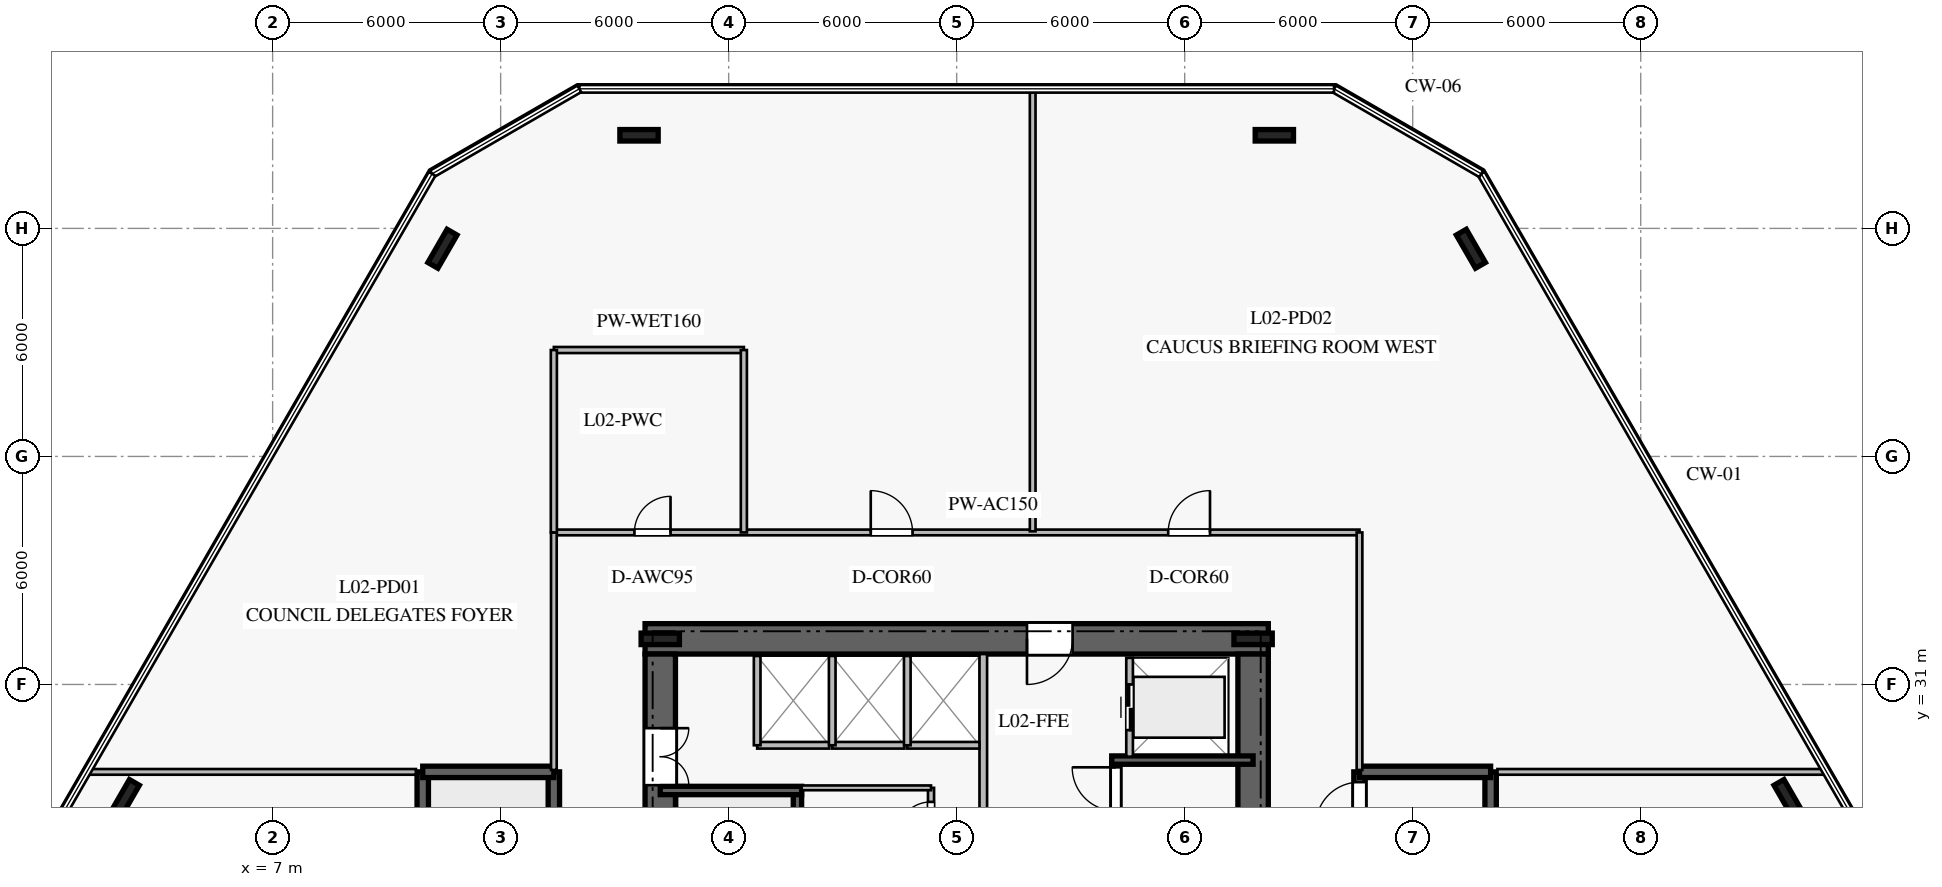
"""IFC4 building model, lengths in metres.
Left out: names, types, materials, properties, quantities, classifications, styles, units other than length and angle.
Written with IfcOpenShell. Run it as: python <this file> out.ifc"""

import sys

from ifc_helpers import new_model, si_unit, direction, frame, frame_2d, origin, origin_2d, place, context, subcontext, project, spatial, rectangle, i_section, extrude, element, fill, save


model = new_model("IFC4")
c1 = context("Model", 3, precision=1e-05, world=origin(), true_north=direction((0.0, 1.0)))
c2 = subcontext(c1, "Body", "Model", "MODEL_VIEW")
j1 = project(units=[si_unit("LENGTHUNIT", "METRE"), si_unit("PLANEANGLEUNIT", "RADIAN")], contexts=[c1])
p1 = place(None, origin())
s1 = spatial("IfcSite", under=j1, at=p1, CompositionType="ELEMENT")
p2 = place(p1, origin())
s2 = spatial("IfcBuilding", under=s1, at=p2, CompositionType="ELEMENT")
p3 = place(p2, frame((0.0, 0.0, 9.8)))
s3 = spatial("IfcBuildingStorey", under=s2, at=p3, CompositionType="ELEMENT", Elevation=9.8)
p4 = place(p3, frame((33.2, 32.2, 0.0), z_axis=(0.0, 0.0, 1.0), x_axis=(-1.0, 0.0, 0.0)))
e1 = element("IfcWall", 1, at=p4, inside=s3, PredefinedType="SHEAR", context=c2, shape_type="SweptSolid", body=[
    extrude(rectangle(XDim=16.4, YDim=0.8, at=frame_2d((8.2, 0.0))), origin(), (0.0, 0.0, 1.0), 4.34),
])
p5 = place(p4, frame((5.15, 0.0, 0.0)))
e2 = element("IfcOpeningElement", 2, at=p5, cuts=e1, PredefinedType="OPENING", context=c2, shape_type="SweptSolid", body=[
    extrude(rectangle(XDim=1.2, YDim=2.25, at=frame_2d((0.6, 1.125))), frame((0.0, 0.41, 0.0), z_axis=(0.0, -1.0, 0.0), x_axis=(1.0, 0.0, 0.0)), (0.0, 0.0, 1.0), 0.82),
])
p6 = place(p3, frame((17.2, 31.8, 0.0), z_axis=(0.0, 0.0, 1.0), x_axis=(0.0, -1.0, 0.0)))
e3 = element("IfcWall", 3, at=p6, inside=s3, PredefinedType="SHEAR", context=c2, shape_type="SweptSolid", body=[
    extrude(rectangle(XDim=13.6, YDim=0.8, at=frame_2d((6.8, 0.0))), origin(), (0.0, 0.0, 1.0), 4.34),
])
p7 = place(p6, frame((1.95, 0.0, 0.0)))
e4 = element("IfcOpeningElement", 4, at=p7, cuts=e3, PredefinedType="OPENING", context=c2, shape_type="SweptSolid", body=[
    extrude(rectangle(XDim=1.5, YDim=2.2, at=frame_2d((0.75, 1.1))), frame((0.0, 0.41, 0.0), z_axis=(0.0, -1.0, 0.0), x_axis=(1.0, 0.0, 0.0)), (0.0, 0.0, 1.0), 0.82),
])
p8 = place(p3, frame((32.8, 18.2, 0.0), z_axis=(0.0, 0.0, 1.0), x_axis=(0.0, 1.0, 0.0)))
e5 = element("IfcWall", 5, at=p8, inside=s3, PredefinedType="SHEAR", context=c2, shape_type="SweptSolid", body=[
    extrude(rectangle(XDim=13.6, YDim=0.8, at=frame_2d((6.8, 0.0))), origin(), (0.0, 0.0, 1.0), 4.34),
])
for number, where, z_axis, x_axis in (
    (6, (32.8, 32.2, 0.0), (0.0, 0.0, 1.0), (1.0, 0.0, 0.0)),
    (7, (17.2, 32.2, 0.0), (0.0, 0.0, 1.0), (1.0, 0.0, 0.0)),
):
    element("IfcColumn", number, at=place(p3, frame(where, z_axis=z_axis, x_axis=x_axis)), inside=s3, PredefinedType="COLUMN", context=c2, shape_type="SweptSolid", body=[
        extrude(i_section(OverallWidth=0.302, OverallDepth=1.008, WebThickness=0.021, FlangeThickness=0.04, at=origin_2d()), origin(), (0.0, 0.0, 1.0), 4.6),
    ])
p9 = place(p3, frame((20.81, 20.99, 0.0), z_axis=(0.0, 0.0, 1.0), x_axis=(0.0, 1.0, 0.0)))
e8 = element("IfcWall", 8, at=p9, inside=s3, PredefinedType="SOLIDWALL", context=c2, shape_type="SweptSolid", body=[
    extrude(rectangle(XDim=7.22, YDim=0.22, at=frame_2d((3.61, 0.0))), origin(), (0.0, 0.0, 1.0), 4.34),
])
p10 = place(p9, frame((0.18, 0.0, 0.0)))
e9 = element("IfcOpeningElement", 9, at=p10, cuts=e8, PredefinedType="OPENING", context=c2, shape_type="SweptSolid", body=[
    extrude(rectangle(XDim=1.15, YDim=2.2, at=frame_2d((0.575, 1.1))), frame((0.0, 0.12, 0.0), z_axis=(0.0, -1.0, 0.0), x_axis=(1.0, 0.0, 0.0)), (0.0, 0.0, 1.0), 0.24),
])
p11 = place(p3, frame((17.2, 28.21, 0.0), z_axis=(0.0, 0.0, 1.0), x_axis=(1.0, 0.0, 0.0)))
e10 = element("IfcWall", 10, at=p11, inside=s3, PredefinedType="SOLIDWALL", context=c2, shape_type="SweptSolid", body=[
    extrude(rectangle(XDim=3.72, YDim=0.22, at=frame_2d((1.86, 0.0))), origin(), (0.0, 0.0, 1.0), 4.34),
])
p12 = place(p3, frame((29.19, 21.79, 0.0), z_axis=(0.0, 0.0, 1.0), x_axis=(0.0, 1.0, 0.0)))
e11 = element("IfcWall", 11, at=p12, inside=s3, PredefinedType="SOLIDWALL", context=c2, shape_type="SweptSolid", body=[
    extrude(rectangle(XDim=7.22, YDim=0.22, at=frame_2d((3.61, 0.0))), origin(), (0.0, 0.0, 1.0), 4.34),
])
p13 = place(p12, frame((5.88, 0.0, 0.0)))
e12 = element("IfcOpeningElement", 12, at=p13, cuts=e11, PredefinedType="OPENING", context=c2, shape_type="SweptSolid", body=[
    extrude(rectangle(XDim=1.15, YDim=2.2, at=frame_2d((0.575, 1.1))), frame((0.0, 0.12, 0.0), z_axis=(0.0, -1.0, 0.0), x_axis=(1.0, 0.0, 0.0)), (0.0, 0.0, 1.0), 0.24),
])
p14 = place(p3, frame((29.08, 29.01, 0.0), z_axis=(0.0, 0.0, 1.0), x_axis=(1.0, 0.0, 0.0)))
e13 = element("IfcWall", 13, at=p14, inside=s3, PredefinedType="SOLIDWALL", context=c2, shape_type="SweptSolid", body=[
    extrude(rectangle(XDim=3.72, YDim=0.22, at=frame_2d((1.86, 0.0))), origin(), (0.0, 0.0, 1.0), 4.34),
])
p15 = place(p3, frame((14.4, 21.3, 0.0), z_axis=(0.0, 0.0, 1.0), x_axis=(0.0, 1.0, 0.0)))
e14 = element("IfcWall", 14, at=p15, inside=s3, PredefinedType="SOLIDWALL", context=c2, shape_type="SweptSolid", body=[
    extrude(rectangle(XDim=7.4, YDim=0.3, at=frame_2d((3.7, 0.0))), origin(), (0.0, 0.0, 1.0), 4.34),
])
p16 = place(p15, frame((0.22, 0.0, 0.0)))
e15 = element("IfcOpeningElement", 15, at=p16, cuts=e14, PredefinedType="OPENING", context=c2, shape_type="SweptSolid", body=[
    extrude(rectangle(XDim=1.15, YDim=2.2, at=frame_2d((0.575, 1.1))), frame((0.0, 0.16, 0.0), z_axis=(0.0, -1.0, 0.0), x_axis=(1.0, 0.0, 0.0)), (0.0, 0.0, 1.0), 0.32),
])
p17 = place(p3, frame((10.95, 21.3, 0.0), z_axis=(0.0, 0.0, 1.0), x_axis=(0.0, 1.0, 0.0)))
e16 = element("IfcWall", 16, at=p17, inside=s3, PredefinedType="SOLIDWALL", context=c2, shape_type="SweptSolid", body=[
    extrude(rectangle(XDim=7.4, YDim=0.3, at=frame_2d((3.7, 0.0))), origin(), (0.0, 0.0, 1.0), 4.34),
])
p18 = place(p3, frame((10.95, 28.7, 0.0), z_axis=(0.0, 0.0, 1.0), x_axis=(1.0, 0.0, 0.0)))
e17 = element("IfcWall", 17, at=p18, inside=s3, PredefinedType="SOLIDWALL", context=c2, shape_type="SweptSolid", body=[
    extrude(rectangle(XDim=3.45, YDim=0.3, at=frame_2d((1.725, 0.0))), origin(), (0.0, 0.0, 1.0), 4.34),
])
p19 = place(p3, frame((35.6, 21.3, 0.0), z_axis=(0.0, 0.0, 1.0), x_axis=(0.0, 1.0, 0.0)))
e18 = element("IfcWall", 18, at=p19, inside=s3, PredefinedType="SOLIDWALL", context=c2, shape_type="SweptSolid", body=[
    extrude(rectangle(XDim=7.4, YDim=0.3, at=frame_2d((3.7, 0.0))), origin(), (0.0, 0.0, 1.0), 4.34),
])
p20 = place(p19, frame((5.98, 0.0, 0.0)))
e19 = element("IfcOpeningElement", 19, at=p20, cuts=e18, PredefinedType="OPENING", context=c2, shape_type="SweptSolid", body=[
    extrude(rectangle(XDim=1.15, YDim=2.2, at=frame_2d((0.575, 1.1))), frame((0.0, 0.16, 0.0), z_axis=(0.0, -1.0, 0.0), x_axis=(1.0, 0.0, 0.0)), (0.0, 0.0, 1.0), 0.32),
])
p21 = place(p3, frame((39.05, 21.3, 0.0), z_axis=(0.0, 0.0, 1.0), x_axis=(0.0, 1.0, 0.0)))
e20 = element("IfcWall", 20, at=p21, inside=s3, PredefinedType="SOLIDWALL", context=c2, shape_type="SweptSolid", body=[
    extrude(rectangle(XDim=7.4, YDim=0.3, at=frame_2d((3.7, 0.0))), origin(), (0.0, 0.0, 1.0), 4.34),
])
p22 = place(p3, frame((35.6, 28.7, 0.0), z_axis=(0.0, 0.0, 1.0), x_axis=(1.0, 0.0, 0.0)))
e21 = element("IfcWall", 21, at=p22, inside=s3, PredefinedType="SOLIDWALL", context=c2, shape_type="SweptSolid", body=[
    extrude(rectangle(XDim=3.45, YDim=0.3, at=frame_2d((1.725, 0.0))), origin(), (0.0, 0.0, 1.0), 4.34),
])
for number, where, z_axis, x_axis in (
    (22, (46.89, 27.986, 0.0), (0.0, 0.0, 1.0), (-0.5, 0.866, 0.0)),
    (23, (38.531, 42.464, 0.0), (0.0, 0.0, 1.0), (-0.5, 0.866, 0.0)),
    (24, (33.359, 45.45, 0.0), (0.0, 0.0, 1.0), (1.0, 0.0, 0.0)),
    (25, (16.641, 45.45, 0.0), (0.0, 0.0, 1.0), (1.0, 0.0, 0.0)),
    (26, (11.469, 42.464, 0.0), (0.0, 0.0, 1.0), (0.5, 0.866, 0.0)),
    (27, (3.11, 27.986, 0.0), (0.0, 0.0, 1.0), (0.5, 0.866, 0.0)),
):
    element("IfcColumn", number, at=place(p3, frame(where, z_axis=z_axis, x_axis=x_axis)), inside=s3, PredefinedType="COLUMN", context=c2, shape_type="SweptSolid", body=[
        extrude(i_section(OverallWidth=0.302, OverallDepth=1.008, WebThickness=0.021, FlangeThickness=0.04, at=origin_2d()), origin(), (0.0, 0.0, 1.0), 4.6),
    ])
p23 = place(p3, frame((25.7, 26.65, 0.0), z_axis=(0.0, 0.0, 1.0), x_axis=(0.0, 1.0, 0.0)))
e28 = element("IfcWall", 28, at=p23, inside=s3, PredefinedType="PARTITIONING", context=c2, shape_type="SweptSolid", body=[
    extrude(rectangle(XDim=5.15, YDim=0.2, at=frame_2d((2.575, 0.0))), origin(), (0.0, 0.0, 1.0), 4.34),
])
p24 = place(p3, frame((24.325, 23.35, 0.0), z_axis=(0.0, 0.0, 1.0), x_axis=(0.0, 1.0, 0.0)))
e29 = element("IfcWall", 29, at=p24, inside=s3, PredefinedType="PLUMBINGWALL", context=c2, shape_type="SweptSolid", body=[
    extrude(rectangle(XDim=4.93, YDim=0.16, at=frame_2d((2.465, 0.0))), origin(), (0.0, 0.0, 1.0), 4.34),
])
p25 = place(p24, frame((0.375, 0.0, 0.0)))
e30 = element("IfcOpeningElement", 30, at=p25, cuts=e29, PredefinedType="OPENING", context=c2, shape_type="SweptSolid", body=[
    extrude(rectangle(XDim=0.95, YDim=2.1, at=frame_2d((0.475, 1.05))), frame((0.0, 0.09, 0.0), z_axis=(0.0, -1.0, 0.0), x_axis=(1.0, 0.0, 0.0)), (0.0, 0.0, 1.0), 0.18),
])
p26 = place(p24, frame((2.035, 0.0, 0.0)))
e31 = element("IfcOpeningElement", 31, at=p26, cuts=e29, PredefinedType="OPENING", context=c2, shape_type="SweptSolid", body=[
    extrude(rectangle(XDim=0.9, YDim=2.1, at=frame_2d((0.45, 1.05))), frame((0.0, 0.09, 0.0), z_axis=(0.0, -1.0, 0.0), x_axis=(1.0, 0.0, 0.0)), (0.0, 0.0, 1.0), 0.18),
])
p27 = place(p24, frame((3.66, 0.0, 0.0)))
e32 = element("IfcOpeningElement", 32, at=p27, cuts=e29, PredefinedType="OPENING", context=c2, shape_type="SweptSolid", body=[
    extrude(rectangle(XDim=0.9, YDim=2.1, at=frame_2d((0.45, 1.05))), frame((0.0, 0.09, 0.0), z_axis=(0.0, -1.0, 0.0), x_axis=(1.0, 0.0, 0.0)), (0.0, 0.0, 1.0), 0.18),
])
p28 = place(p3, frame((20.92, 28.28, 0.0), z_axis=(0.0, 0.0, 1.0), x_axis=(1.0, 0.0, 0.0)))
e33 = element("IfcWall", 33, at=p28, inside=s3, PredefinedType="PARTITIONING", context=c2, shape_type="SweptSolid", body=[
    extrude(rectangle(XDim=3.405, YDim=0.125, at=frame_2d((1.703, 0.0))), origin(), (0.0, 0.0, 1.0), 4.34),
])
p29 = place(p3, frame((19.75, 29.4, 0.0), z_axis=(0.0, 0.0, 1.0), x_axis=(1.0, 0.0, 0.0)))
e34 = element("IfcWall", 34, at=p29, inside=s3, PredefinedType="PARTITIONING", context=c2, shape_type="SweptSolid", body=[
    extrude(rectangle(XDim=1.9, YDim=0.175, at=frame_2d((0.95, 0.0))), origin(), (0.0, 0.0, 1.0), 4.34),
])
p30 = place(p3, frame((19.75, 29.4, 0.0), z_axis=(0.0, 0.0, 1.0), x_axis=(0.0, 1.0, 0.0)))
e35 = element("IfcWall", 35, at=p30, inside=s3, PredefinedType="PARTITIONING", context=c2, shape_type="SweptSolid", body=[
    extrude(rectangle(XDim=2.35, YDim=0.175, at=frame_2d((1.175, 0.0))), origin(), (0.0, 0.0, 1.0), 4.34),
])
p31 = place(p3, frame((21.725, 29.4, 0.0), z_axis=(0.0, 0.0, 1.0), x_axis=(1.0, 0.0, 0.0)))
e36 = element("IfcWall", 36, at=p31, inside=s3, PredefinedType="PARTITIONING", context=c2, shape_type="SweptSolid", body=[
    extrude(rectangle(XDim=1.9, YDim=0.175, at=frame_2d((0.95, 0.0))), origin(), (0.0, 0.0, 1.0), 4.34),
])
p32 = place(p3, frame((21.725, 29.4, 0.0), z_axis=(0.0, 0.0, 1.0), x_axis=(0.0, 1.0, 0.0)))
e37 = element("IfcWall", 37, at=p32, inside=s3, PredefinedType="PARTITIONING", context=c2, shape_type="SweptSolid", body=[
    extrude(rectangle(XDim=2.35, YDim=0.175, at=frame_2d((1.175, 0.0))), origin(), (0.0, 0.0, 1.0), 4.34),
])
p33 = place(p3, frame((23.7, 29.4, 0.0), z_axis=(0.0, 0.0, 1.0), x_axis=(1.0, 0.0, 0.0)))
e38 = element("IfcWall", 38, at=p33, inside=s3, PredefinedType="PARTITIONING", context=c2, shape_type="SweptSolid", body=[
    extrude(rectangle(XDim=1.9, YDim=0.175, at=frame_2d((0.95, 0.0))), origin(), (0.0, 0.0, 1.0), 4.34),
])
p34 = place(p3, frame((23.7, 29.4, 0.0), z_axis=(0.0, 0.0, 1.0), x_axis=(0.0, 1.0, 0.0)))
e39 = element("IfcWall", 39, at=p34, inside=s3, PredefinedType="PARTITIONING", context=c2, shape_type="SweptSolid", body=[
    extrude(rectangle(XDim=2.35, YDim=0.175, at=frame_2d((1.175, 0.0))), origin(), (0.0, 0.0, 1.0), 4.34),
])
p35 = place(p3, frame((29.55, 29.1, 0.0), z_axis=(0.0, 0.0, 1.0), x_axis=(0.0, 1.0, 0.0)))
e40 = element("IfcWall", 40, at=p35, inside=s3, PredefinedType="PARTITIONING", context=c2, shape_type="SweptSolid", body=[
    extrude(rectangle(XDim=2.6, YDim=0.175, at=frame_2d((1.3, 0.0))), origin(), (0.0, 0.0, 1.0), 4.34),
])
p36 = place(p35, frame((0.7, 0.0, 0.0)))
e41 = element("IfcOpeningElement", 41, at=p36, cuts=e40, PredefinedType="OPENING", context=c2, shape_type="SweptSolid", body=[
    extrude(rectangle(XDim=1.2, YDim=2.2, at=frame_2d((0.6, 1.1))), frame((0.0, 0.098, 0.0), z_axis=(0.0, -1.0, 0.0), x_axis=(1.0, 0.0, 0.0)), (0.0, 0.0, 1.0), 0.195),
])
p37 = place(p3, frame((14.4, 35.0, 0.0), z_axis=(0.0, 0.0, 1.0), x_axis=(1.0, 0.0, 0.0)))
e42 = element("IfcWall", 42, at=p37, inside=s3, PredefinedType="PARTITIONING", context=c2, shape_type="SweptSolid", body=[
    extrude(rectangle(XDim=21.2, YDim=0.15, at=frame_2d((10.6, 0.0))), origin(), (0.0, 0.0, 1.0), 3.79),
])
p38 = place(p37, frame((2.12, 0.0, 0.0)))
e43 = element("IfcOpeningElement", 43, at=p38, cuts=e42, PredefinedType="OPENING", context=c2, shape_type="SweptSolid", body=[
    extrude(rectangle(XDim=0.95, YDim=2.1, at=frame_2d((0.475, 1.05))), frame((0.0, 0.085, 0.0), z_axis=(0.0, -1.0, 0.0), x_axis=(1.0, 0.0, 0.0)), (0.0, 0.0, 1.0), 0.17),
])
p39 = place(p37, frame((8.339, 0.0, 0.0)))
e44 = element("IfcOpeningElement", 44, at=p39, cuts=e42, PredefinedType="OPENING", context=c2, shape_type="SweptSolid", body=[
    extrude(rectangle(XDim=1.1, YDim=2.2, at=frame_2d((0.55, 1.1))), frame((0.0, 0.085, 0.0), z_axis=(0.0, -1.0, 0.0), x_axis=(1.0, 0.0, 0.0)), (0.0, 0.0, 1.0), 0.17),
])
p40 = place(p37, frame((16.166, 0.0, 0.0)))
e45 = element("IfcOpeningElement", 45, at=p40, cuts=e42, PredefinedType="OPENING", context=c2, shape_type="SweptSolid", body=[
    extrude(rectangle(XDim=1.1, YDim=2.2, at=frame_2d((0.55, 1.1))), frame((0.0, 0.085, 0.0), z_axis=(0.0, -1.0, 0.0), x_axis=(1.0, 0.0, 0.0)), (0.0, 0.0, 1.0), 0.17),
])
p41 = place(p3, frame((14.4, 28.75, 0.0), z_axis=(0.0, 0.0, 1.0), x_axis=(0.0, 1.0, 0.0)))
e46 = element("IfcWall", 46, at=p41, inside=s3, PredefinedType="PARTITIONING", context=c2, shape_type="SweptSolid", body=[
    extrude(rectangle(XDim=6.25, YDim=0.15, at=frame_2d((3.125, 0.0))), origin(), (0.0, 0.0, 1.0), 4.34),
])
p42 = place(p3, frame((35.6, 28.75, 0.0), z_axis=(0.0, 0.0, 1.0), x_axis=(0.0, 1.0, 0.0)))
e47 = element("IfcWall", 47, at=p42, inside=s3, PredefinedType="PARTITIONING", context=c2, shape_type="SweptSolid", body=[
    extrude(rectangle(XDim=6.25, YDim=0.15, at=frame_2d((3.125, 0.0))), origin(), (0.0, 0.0, 1.0), 3.79),
])
p43 = place(p3, frame((14.4, 39.8, 0.0), z_axis=(0.0, 0.0, 1.0), x_axis=(1.0, 0.0, 0.0)))
e48 = element("IfcWall", 48, at=p43, inside=s3, PredefinedType="PLUMBINGWALL", context=c2, shape_type="SweptSolid", body=[
    extrude(rectangle(XDim=5.0, YDim=0.16, at=frame_2d((2.5, 0.0))), origin(), (0.0, 0.0, 1.0), 3.79),
])
p44 = place(p3, frame((19.4, 35.0, 0.0), z_axis=(0.0, 0.0, 1.0), x_axis=(0.0, 1.0, 0.0)))
e49 = element("IfcWall", 49, at=p44, inside=s3, PredefinedType="PLUMBINGWALL", context=c2, shape_type="SweptSolid", body=[
    extrude(rectangle(XDim=4.8, YDim=0.16, at=frame_2d((2.4, 0.0))), origin(), (0.0, 0.0, 1.0), 4.34),
])
p45 = place(p3, frame((14.4, 35.0, 0.0), z_axis=(0.0, 0.0, 1.0), x_axis=(0.0, 1.0, 0.0)))
e50 = element("IfcWall", 50, at=p45, inside=s3, PredefinedType="PLUMBINGWALL", context=c2, shape_type="SweptSolid", body=[
    extrude(rectangle(XDim=4.8, YDim=0.16, at=frame_2d((2.4, 0.0))), origin(), (0.0, 0.0, 1.0), 3.79),
])
for number, where, z_axis, x_axis in (
    (51, (2.08, 28.7, 0.0), (0.0, 0.0, 1.0), (1.0, 0.0, 0.0)),
    (52, (39.23, 28.7, 0.0), (0.0, 0.0, 1.0), (1.0, 0.0, 0.0)),
):
    element("IfcWall", number, at=place(p3, frame(where, z_axis=z_axis, x_axis=x_axis)), inside=s3, PredefinedType="PARTITIONING", context=c2, shape_type="SweptSolid", body=[
        extrude(rectangle(XDim=8.69, YDim=0.15, at=frame_2d((4.345, 0.0))), origin(), (0.0, 0.0, 1.0), 3.64),
    ])
p46 = place(p3, frame((27.0, 35.03, 0.0), z_axis=(0.0, 0.0, 1.0), x_axis=(0.0, 1.0, 0.0)))
e53 = element("IfcWall", 53, at=p46, inside=s3, PredefinedType="PARTITIONING", context=c2, shape_type="SweptSolid", body=[
    extrude(rectangle(XDim=11.67, YDim=0.15, at=frame_2d((5.835, 0.0))), origin(), (0.0, 0.0, 1.0), 3.64),
])
p47 = place(p13, origin())
e54 = element("IfcDoor", 54, at=p47, inside=s3, OperationType="SINGLE_SWING_RIGHT", PredefinedType="DOOR", context=c2, shape_type="SweptSolid", body=[
    extrude(rectangle(XDim=1.15, YDim=2.2, at=frame_2d((0.575, 1.1))), frame((0.0, 0.025, 0.0), z_axis=(0.0, -1.0, 0.0), x_axis=(1.0, 0.0, 0.0)), (0.0, 0.0, 1.0), 0.05),
])
fill(e12, e54)
p48 = place(p5, origin())
e55 = element("IfcDoor", 55, at=p48, inside=s3, OperationType="SINGLE_SWING_RIGHT", PredefinedType="DOOR", context=c2, shape_type="SweptSolid", body=[
    extrude(rectangle(XDim=1.2, YDim=2.25, at=frame_2d((0.6, 1.125))), frame((0.0, 0.025, 0.0), z_axis=(0.0, -1.0, 0.0), x_axis=(1.0, 0.0, 0.0)), (0.0, 0.0, 1.0), 0.05),
])
fill(e2, e55)
p49 = place(p7, origin())
e56 = element("IfcDoor", 56, at=p49, inside=s3, OperationType="DOUBLE_DOOR_SINGLE_SWING", PredefinedType="DOOR", context=c2, shape_type="SweptSolid", body=[
    extrude(rectangle(XDim=1.5, YDim=2.2, at=frame_2d((0.75, 1.1))), frame((0.0, 0.025, 0.0), z_axis=(0.0, -1.0, 0.0), x_axis=(1.0, 0.0, 0.0)), (0.0, 0.0, 1.0), 0.05),
])
fill(e4, e56)
p50 = place(p27, origin())
e57 = element("IfcDoor", 57, at=p50, inside=s3, OperationType="SINGLE_SWING_LEFT", PredefinedType="DOOR", context=c2, shape_type="SweptSolid", body=[
    extrude(rectangle(XDim=0.9, YDim=2.1, at=frame_2d((0.45, 1.05))), frame((0.0, 0.025, 0.0), z_axis=(0.0, -1.0, 0.0), x_axis=(1.0, 0.0, 0.0)), (0.0, 0.0, 1.0), 0.05),
])
fill(e32, e57)
p51 = place(p36, origin())
e58 = element("IfcDoor", 58, at=p51, inside=s3, OperationType="DOUBLE_DOOR_SLIDING", PredefinedType="DOOR", context=c2, shape_type="SweptSolid", body=[
    extrude(rectangle(XDim=1.2, YDim=2.2, at=frame_2d((0.6, 1.1))), frame((0.0, 0.025, 0.0), z_axis=(0.0, -1.0, 0.0), x_axis=(1.0, 0.0, 0.0)), (0.0, 0.0, 1.0), 0.05),
])
fill(e41, e58)
p52 = place(p20, origin())
e59 = element("IfcDoor", 59, at=p52, inside=s3, OperationType="SINGLE_SWING_LEFT", PredefinedType="DOOR", context=c2, shape_type="SweptSolid", body=[
    extrude(rectangle(XDim=1.15, YDim=2.2, at=frame_2d((0.575, 1.1))), frame((0.0, 0.025, 0.0), z_axis=(0.0, -1.0, 0.0), x_axis=(1.0, 0.0, 0.0)), (0.0, 0.0, 1.0), 0.05),
])
fill(e19, e59)
p53 = place(p38, origin())
e60 = element("IfcDoor", 60, at=p53, inside=s3, OperationType="SINGLE_SWING_RIGHT", PredefinedType="DOOR", context=c2, shape_type="SweptSolid", body=[
    extrude(rectangle(XDim=0.95, YDim=2.1, at=frame_2d((0.475, 1.05))), frame((0.0, 0.025, 0.0), z_axis=(0.0, -1.0, 0.0), x_axis=(1.0, 0.0, 0.0)), (0.0, 0.0, 1.0), 0.05),
])
fill(e43, e60)
p54 = place(p39, origin())
e61 = element("IfcDoor", 61, at=p54, inside=s3, OperationType="SINGLE_SWING_LEFT", PredefinedType="DOOR", context=c2, shape_type="SweptSolid", body=[
    extrude(rectangle(XDim=1.1, YDim=2.2, at=frame_2d((0.55, 1.1))), frame((0.0, 0.025, 0.0), z_axis=(0.0, -1.0, 0.0), x_axis=(1.0, 0.0, 0.0)), (0.0, 0.0, 1.0), 0.05),
])
fill(e44, e61)
p55 = place(p40, origin())
e62 = element("IfcDoor", 62, at=p55, inside=s3, OperationType="SINGLE_SWING_RIGHT", PredefinedType="DOOR", context=c2, shape_type="SweptSolid", body=[
    extrude(rectangle(XDim=1.1, YDim=2.2, at=frame_2d((0.55, 1.1))), frame((0.0, 0.025, 0.0), z_axis=(0.0, -1.0, 0.0), x_axis=(1.0, 0.0, 0.0)), (0.0, 0.0, 1.0), 0.05),
])
fill(e45, e62)
save(model, sys.argv[1])
